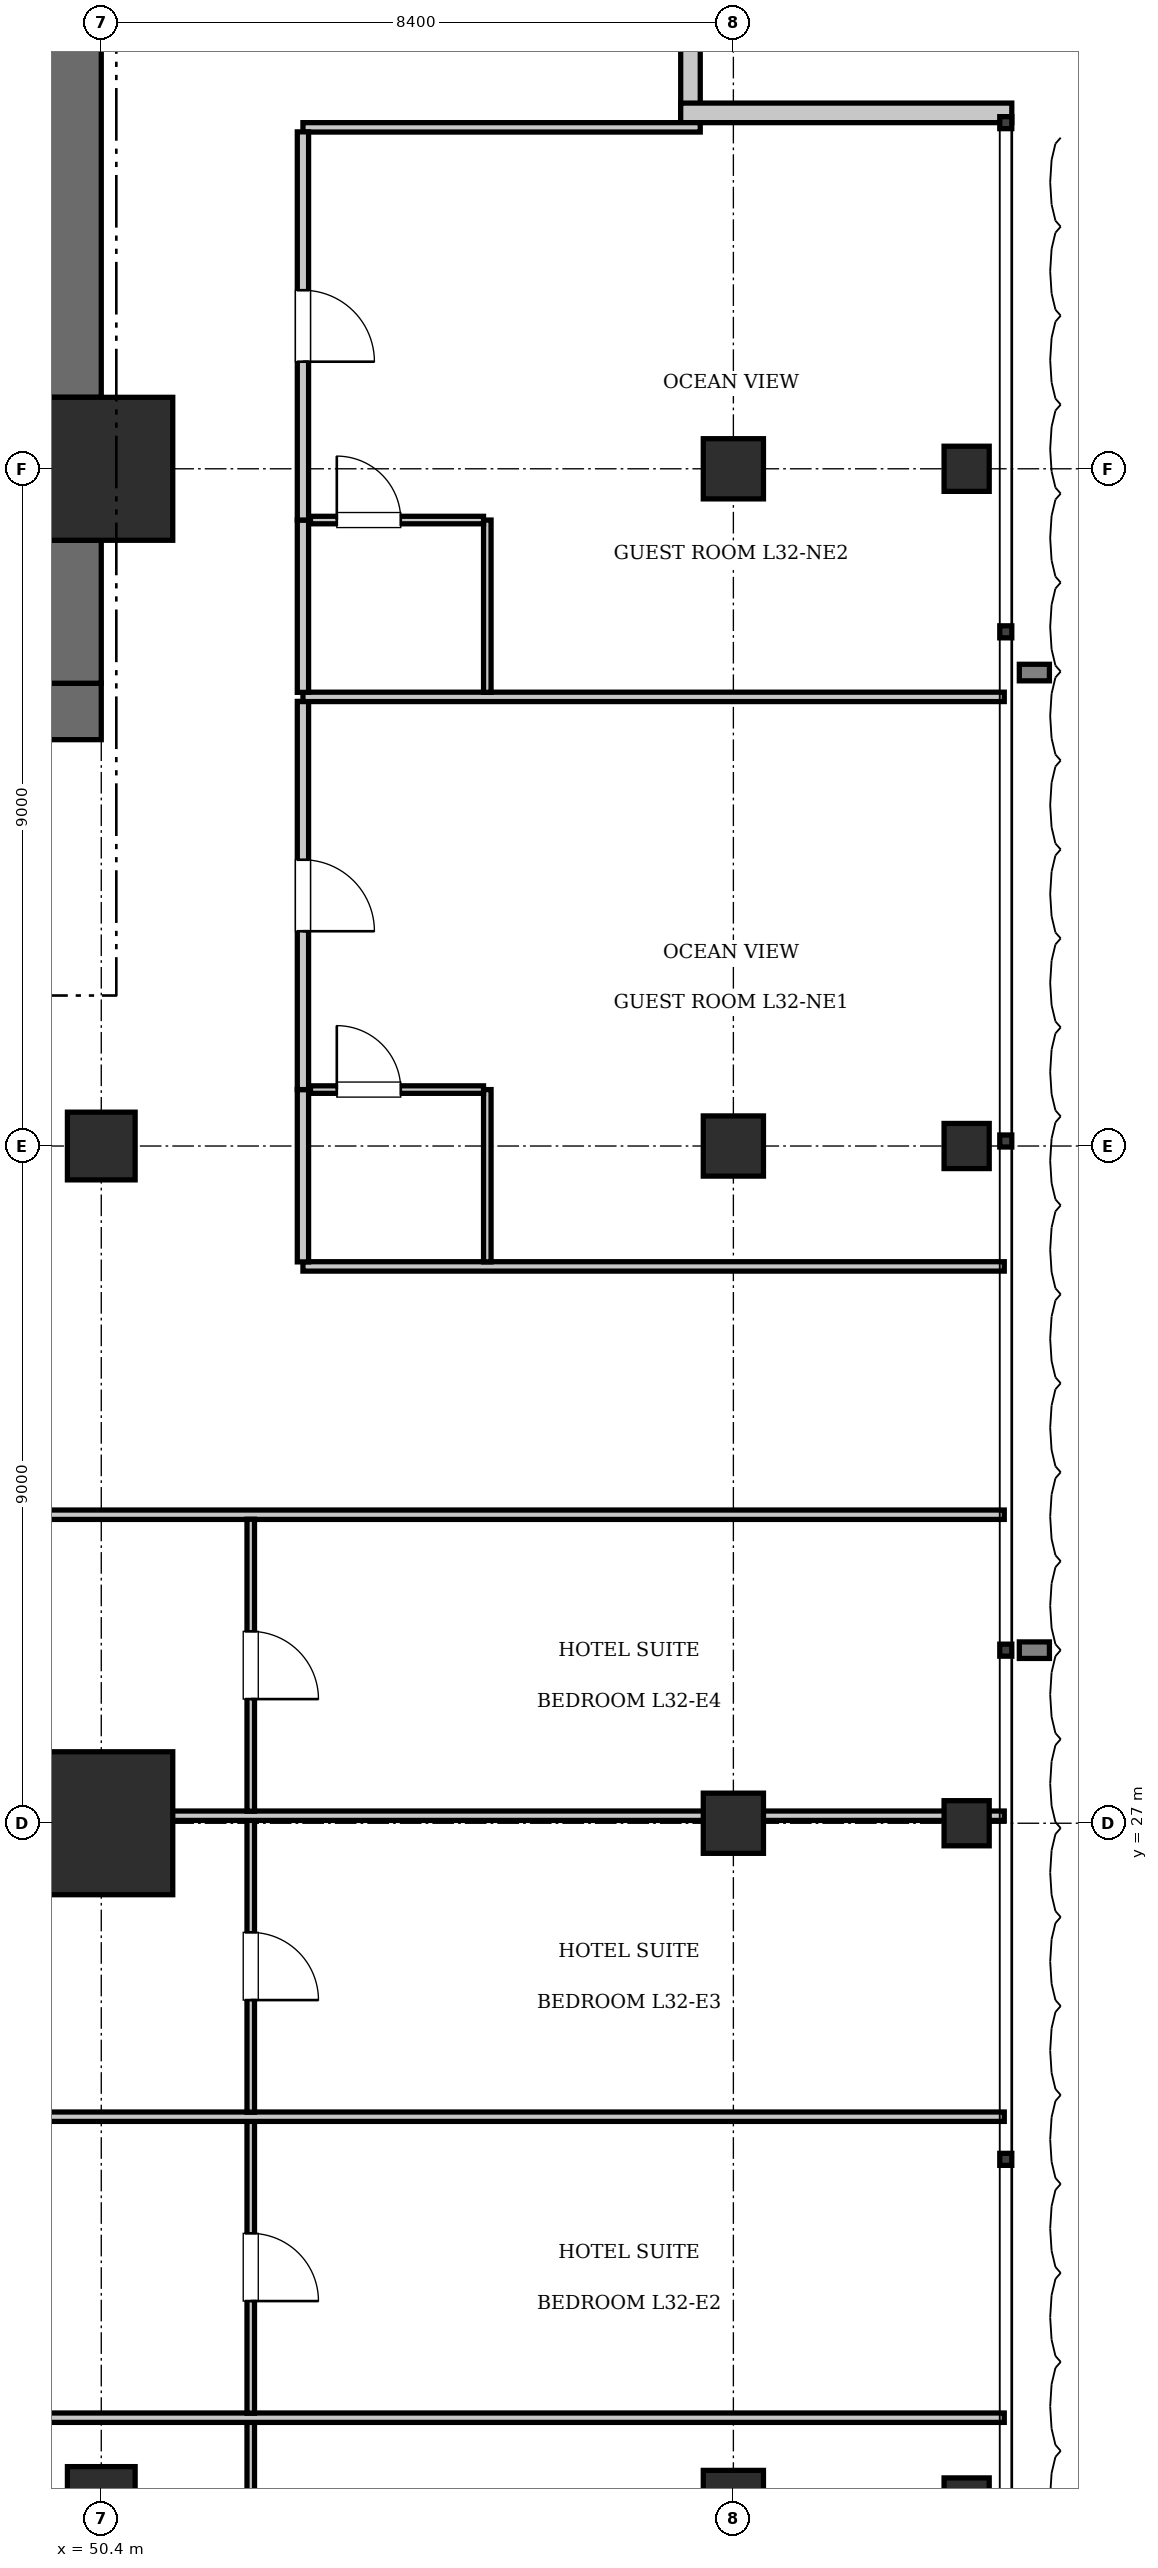
"""IFC4 building model, lengths in metres.
Left out: names, types, materials, properties, quantities, classifications, styles, units other than length and angle.
Written with IfcOpenShell. Run it as: python <this file> out.ifc"""

import sys

from ifc_helpers import new_model, si_unit, direction, frame, frame_2d, origin, origin_2d, place, context, subcontext, project, spatial, rectangle, i_section, extrude, element, fill, save


model = new_model("IFC4")
c1 = context("Model", 3, precision=1e-05, world=origin(), true_north=direction((0.0, 1.0)))
c2 = subcontext(c1, "Body", "Model", "MODEL_VIEW")
j1 = project(units=[si_unit("LENGTHUNIT", "METRE"), si_unit("PLANEANGLEUNIT", "RADIAN")], contexts=[c1])
p1 = place(None, origin())
s1 = spatial("IfcSite", under=j1, at=p1, CompositionType="ELEMENT")
p2 = place(p1, origin())
s2 = spatial("IfcBuilding", under=s1, at=p2, CompositionType="ELEMENT")
p3 = place(p2, frame((0.0, 0.0, 135.1)))
s3 = spatial("IfcBuildingStorey", under=s2, at=p3, CompositionType="ELEMENT", Elevation=135.1)
for number, where, z_axis, x_axis in (
    (1, (50.4, 27.0, 0.0), (0.0, 0.0, 1.0), (1.0, 0.0, 0.0)),
    (2, (50.4, 45.0, 0.0), (0.0, 0.0, 1.0), (1.0, 0.0, 0.0)),
):
    element("IfcColumn", number, at=place(p3, frame(where, z_axis=z_axis, x_axis=x_axis)), inside=s3, PredefinedType="COLUMN", context=c2, shape_type="SweptSolid", body=[
        extrude(rectangle(XDim=1.9, YDim=1.9, at=origin_2d()), origin(), (0.0, 0.0, 1.0), 3.85),
    ])
p4 = place(p3, frame((43.6, 41.775, 0.0), z_axis=(0.0, 0.0, 1.0), x_axis=(1.0, 0.0, 0.0)))
e3 = element("IfcWall", 3, at=p4, inside=s3, PredefinedType="SHEAR", context=c2, shape_type="SweptSolid", body=[
    extrude(rectangle(XDim=6.8, YDim=0.75, at=frame_2d((3.4, 0.0))), origin(), (0.0, 0.0, 1.0), 3.85),
])
p5 = place(p4, frame((3.9, 0.0, 0.0)))
e4 = element("IfcOpeningElement", 4, at=p5, cuts=e3, PredefinedType="OPENING", context=c2, shape_type="SweptSolid", body=[
    extrude(rectangle(XDim=1.15, YDim=2.15, at=frame_2d((0.575, 1.075))), frame((0.0, 0.385, 0.0), z_axis=(0.0, -1.0, 0.0), x_axis=(1.0, 0.0, 0.0)), (0.0, 0.0, 1.0), 0.77),
])
p6 = place(p4, frame((0.55, 0.0, 0.0)))
e5 = element("IfcOpeningElement", 5, at=p6, cuts=e3, PredefinedType="OPENING", context=c2, shape_type="SweptSolid", body=[
    extrude(rectangle(XDim=1.1, YDim=2.2, at=frame_2d((0.55, 1.1))), frame((0.0, 0.385, 0.0), z_axis=(0.0, -1.0, 0.0), x_axis=(1.0, 0.0, 0.0)), (0.0, 0.0, 1.0), 0.77),
])
p7 = place(p3, frame((50.025, 42.15, 0.0), z_axis=(0.0, 0.0, 1.0), x_axis=(0.0, 1.0, 0.0)))
e6 = element("IfcWall", 6, at=p7, inside=s3, PredefinedType="SHEAR", context=c2, shape_type="SweptSolid", body=[
    extrude(rectangle(XDim=1.9, YDim=0.75, at=frame_2d((0.95, 0.0))), origin(), (0.0, 0.0, 1.0), 3.85),
])
p8 = place(p3, frame((50.025, 45.95, 0.0), z_axis=(0.0, 0.0, 1.0), x_axis=(0.0, 1.0, 0.0)))
e7 = element("IfcWall", 7, at=p8, inside=s3, PredefinedType="SHEAR", context=c2, shape_type="SweptSolid", body=[
    extrude(rectangle(XDim=7.3, YDim=0.75, at=frame_2d((3.65, 0.0))), origin(), (0.0, 0.0, 1.0), 3.85),
])
for number, where, z_axis, x_axis in (
    (8, (50.4, 36.0, 0.0), (0.0, 0.0, 1.0), (1.0, 0.0, 0.0)),
    (9, (50.4, 18.0, 0.0), (0.0, 0.0, 1.0), (1.0, 0.0, 0.0)),
):
    element("IfcColumn", number, at=place(p3, frame(where, z_axis=z_axis, x_axis=x_axis)), inside=s3, PredefinedType="COLUMN", context=c2, shape_type="SweptSolid", body=[
        extrude(rectangle(XDim=0.9, YDim=0.9, at=origin_2d()), origin(), (0.0, 0.0, 1.0), 3.85),
    ])
for number, where, z_axis, x_axis in (
    (10, (58.8, 18.0, 0.0), (0.0, 0.0, 1.0), (1.0, 0.0, 0.0)),
    (11, (58.8, 27.0, 0.0), (0.0, 0.0, 1.0), (1.0, 0.0, 0.0)),
    (12, (58.8, 36.0, 0.0), (0.0, 0.0, 1.0), (1.0, 0.0, 0.0)),
    (13, (58.8, 45.0, 0.0), (0.0, 0.0, 1.0), (1.0, 0.0, 0.0)),
):
    element("IfcColumn", number, at=place(p3, frame(where, z_axis=z_axis, x_axis=x_axis)), inside=s3, PredefinedType="COLUMN", context=c2, shape_type="SweptSolid", body=[
        extrude(rectangle(XDim=0.8, YDim=0.8, at=origin_2d()), origin(), (0.0, 0.0, 1.0), 3.85),
    ])
for number, where, z_axis, x_axis in (
    (14, (61.9, 18.0, 0.0), (0.0, 0.0, 1.0), (1.0, 0.0, 0.0)),
    (15, (61.9, 27.0, 0.0), (0.0, 0.0, 1.0), (1.0, 0.0, 0.0)),
    (16, (61.9, 36.0, 0.0), (0.0, 0.0, 1.0), (1.0, 0.0, 0.0)),
    (17, (61.9, 45.0, 0.0), (0.0, 0.0, 1.0), (1.0, 0.0, 0.0)),
):
    element("IfcColumn", number, at=place(p3, frame(where, z_axis=z_axis, x_axis=x_axis)), inside=s3, PredefinedType="COLUMN", context=c2, shape_type="SweptSolid", body=[
        extrude(i_section(OverallWidth=0.6, OverallDepth=0.6, WebThickness=0.025, FlangeThickness=0.038, at=origin_2d()), origin(), (0.0, 0.0, 1.0), 3.85),
    ])
for number, where, z_axis, x_axis in (
    (18, (58.23, 54.0, 0.0), (0.0, 0.0, 1.0), (0.0, -1.0, 0.0)),
    (19, (58.1, 49.73, 0.0), (0.0, 0.0, 1.0), (1.0, 0.0, 0.0)),
):
    element("IfcWall", number, at=place(p3, frame(where, z_axis=z_axis, x_axis=x_axis)), inside=s3, PredefinedType="SOLIDWALL", context=c2, shape_type="SweptSolid", body=[
        extrude(rectangle(XDim=4.4, YDim=0.26, at=frame_2d((2.2, 0.0))), origin(), (0.0, 0.0, 1.0), 3.61),
    ])
p9 = place(p3, frame((38.98, 31.1, 0.0), z_axis=(0.0, 0.0, 1.0), x_axis=(1.0, 0.0, 0.0)))
e20 = element("IfcWall", 20, at=p9, inside=s3, PredefinedType="PARTITIONING", context=c2, shape_type="SweptSolid", body=[
    extrude(rectangle(XDim=23.42, YDim=0.125, at=frame_2d((11.71, 0.0))), origin(), (0.0, 0.0, 1.0), 3.61),
])
p10 = place(p3, frame((52.386, 15.16, 0.0), z_axis=(0.0, 0.0, 1.0), x_axis=(0.0, 1.0, 0.0)))
e21 = element("IfcWall", 21, at=p10, inside=s3, PredefinedType="PARTITIONING", context=c2, shape_type="SweptSolid", body=[
    extrude(rectangle(XDim=3.88, YDim=0.1, at=frame_2d((1.94, 0.0))), origin(), (0.0, 0.0, 1.0), 3.61),
])
p11 = place(p10, frame((1.49, 0.0, 0.0)))
e22 = element("IfcOpeningElement", 22, at=p11, cuts=e21, PredefinedType="OPENING", context=c2, shape_type="SweptSolid", body=[
    extrude(rectangle(XDim=0.9, YDim=2.1, at=frame_2d((0.45, 1.05))), frame((0.0, 0.06, 0.0), z_axis=(0.0, -1.0, 0.0), x_axis=(1.0, 0.0, 0.0)), (0.0, 0.0, 1.0), 0.12),
])
p12 = place(p3, frame((38.98, 19.1, 0.0), z_axis=(0.0, 0.0, 1.0), x_axis=(1.0, 0.0, 0.0)))
e23 = element("IfcWall", 23, at=p12, inside=s3, PredefinedType="PARTITIONING", context=c2, shape_type="SweptSolid", body=[
    extrude(rectangle(XDim=23.42, YDim=0.125, at=frame_2d((11.71, 0.0))), origin(), (0.0, 0.0, 1.0), 3.61),
])
p13 = place(p3, frame((52.386, 19.16, 0.0), z_axis=(0.0, 0.0, 1.0), x_axis=(0.0, 1.0, 0.0)))
e24 = element("IfcWall", 24, at=p13, inside=s3, PredefinedType="PARTITIONING", context=c2, shape_type="SweptSolid", body=[
    extrude(rectangle(XDim=3.88, YDim=0.1, at=frame_2d((1.94, 0.0))), origin(), (0.0, 0.0, 1.0), 3.61),
])
p14 = place(p13, frame((1.49, 0.0, 0.0)))
e25 = element("IfcOpeningElement", 25, at=p14, cuts=e24, PredefinedType="OPENING", context=c2, shape_type="SweptSolid", body=[
    extrude(rectangle(XDim=0.9, YDim=2.1, at=frame_2d((0.45, 1.05))), frame((0.0, 0.06, 0.0), z_axis=(0.0, -1.0, 0.0), x_axis=(1.0, 0.0, 0.0)), (0.0, 0.0, 1.0), 0.12),
])
p15 = place(p3, frame((38.98, 23.1, 0.0), z_axis=(0.0, 0.0, 1.0), x_axis=(1.0, 0.0, 0.0)))
e26 = element("IfcWall", 26, at=p15, inside=s3, PredefinedType="PARTITIONING", context=c2, shape_type="SweptSolid", body=[
    extrude(rectangle(XDim=23.42, YDim=0.125, at=frame_2d((11.71, 0.0))), origin(), (0.0, 0.0, 1.0), 3.61),
])
p16 = place(p3, frame((52.386, 23.16, 0.0), z_axis=(0.0, 0.0, 1.0), x_axis=(0.0, 1.0, 0.0)))
e27 = element("IfcWall", 27, at=p16, inside=s3, PredefinedType="PARTITIONING", context=c2, shape_type="SweptSolid", body=[
    extrude(rectangle(XDim=3.88, YDim=0.1, at=frame_2d((1.94, 0.0))), origin(), (0.0, 0.0, 1.0), 3.61),
])
p17 = place(p16, frame((1.49, 0.0, 0.0)))
e28 = element("IfcOpeningElement", 28, at=p17, cuts=e27, PredefinedType="OPENING", context=c2, shape_type="SweptSolid", body=[
    extrude(rectangle(XDim=0.9, YDim=2.1, at=frame_2d((0.45, 1.05))), frame((0.0, 0.06, 0.0), z_axis=(0.0, -1.0, 0.0), x_axis=(1.0, 0.0, 0.0)), (0.0, 0.0, 1.0), 0.12),
])
p18 = place(p3, frame((38.98, 27.1, 0.0), z_axis=(0.0, 0.0, 1.0), x_axis=(1.0, 0.0, 0.0)))
e29 = element("IfcWall", 29, at=p18, inside=s3, PredefinedType="PARTITIONING", context=c2, shape_type="SweptSolid", body=[
    extrude(rectangle(XDim=23.42, YDim=0.125, at=frame_2d((11.71, 0.0))), origin(), (0.0, 0.0, 1.0), 2.41),
])
p19 = place(p3, frame((52.386, 27.16, 0.0), z_axis=(0.0, 0.0, 1.0), x_axis=(0.0, 1.0, 0.0)))
e30 = element("IfcWall", 30, at=p19, inside=s3, PredefinedType="PARTITIONING", context=c2, shape_type="SweptSolid", body=[
    extrude(rectangle(XDim=3.88, YDim=0.1, at=frame_2d((1.94, 0.0))), origin(), (0.0, 0.0, 1.0), 3.61),
])
p20 = place(p19, frame((1.49, 0.0, 0.0)))
e31 = element("IfcOpeningElement", 31, at=p20, cuts=e30, PredefinedType="OPENING", context=c2, shape_type="SweptSolid", body=[
    extrude(rectangle(XDim=0.9, YDim=2.1, at=frame_2d((0.45, 1.05))), frame((0.0, 0.06, 0.0), z_axis=(0.0, -1.0, 0.0), x_axis=(1.0, 0.0, 0.0)), (0.0, 0.0, 1.0), 0.12),
])
p21 = place(p3, frame((53.08, 34.4, 0.0), z_axis=(0.0, 0.0, 1.0), x_axis=(1.0, 0.0, 0.0)))
e32 = element("IfcWall", 32, at=p21, inside=s3, PredefinedType="PARTITIONING", context=c2, shape_type="SweptSolid", body=[
    extrude(rectangle(XDim=9.32, YDim=0.125, at=frame_2d((4.66, 0.0))), origin(), (0.0, 0.0, 1.0), 3.61),
])
p22 = place(p3, frame((53.08, 49.538, 0.0), z_axis=(0.0, 0.0, 1.0), x_axis=(1.0, 0.0, 0.0)))
e33 = element("IfcWall", 33, at=p22, inside=s3, PredefinedType="PARTITIONING", context=c2, shape_type="SweptSolid", body=[
    extrude(rectangle(XDim=5.28, YDim=0.125, at=frame_2d((2.64, 0.0))), origin(), (0.0, 0.0, 1.0), 3.61),
])
p23 = place(p3, frame((53.08, 34.46, 0.0), z_axis=(0.0, 0.0, 1.0), x_axis=(0.0, 1.0, 0.0)))
e34 = element("IfcWall", 34, at=p23, inside=s3, PredefinedType="PARTITIONING", context=c2, shape_type="SweptSolid", body=[
    extrude(rectangle(XDim=2.29, YDim=0.15, at=frame_2d((1.145, 0.0))), origin(), (0.0, 0.0, 1.0), 3.61),
])
p24 = place(p3, frame((53.08, 36.75, 0.0), z_axis=(0.0, 0.0, 1.0), x_axis=(0.0, 1.0, 0.0)))
e35 = element("IfcWall", 35, at=p24, inside=s3, PredefinedType="PARTITIONING", context=c2, shape_type="SweptSolid", body=[
    extrude(rectangle(XDim=5.159, YDim=0.15, at=frame_2d((2.579, 0.0))), origin(), (0.0, 0.0, 1.0), 3.61),
])
p25 = place(p24, frame((2.104, 0.0, 0.0)))
e36 = element("IfcOpeningElement", 36, at=p25, cuts=e35, PredefinedType="OPENING", context=c2, shape_type="SweptSolid", body=[
    extrude(rectangle(XDim=0.95, YDim=2.15, at=frame_2d((0.475, 1.075))), frame((0.0, 0.085, 0.0), z_axis=(0.0, -1.0, 0.0), x_axis=(1.0, 0.0, 0.0)), (0.0, 0.0, 1.0), 0.17),
])
p26 = place(p3, frame((55.53, 34.46, 0.0), z_axis=(0.0, 0.0, 1.0), x_axis=(0.0, 1.0, 0.0)))
e37 = element("IfcWall", 37, at=p26, inside=s3, PredefinedType="PARTITIONING", context=c2, shape_type="SweptSolid", body=[
    extrude(rectangle(XDim=2.29, YDim=0.1, at=frame_2d((1.145, 0.0))), origin(), (0.0, 0.0, 1.0), 3.61),
])
p27 = place(p3, frame((53.18, 36.75, 0.0), z_axis=(0.0, 0.0, 1.0), x_axis=(1.0, 0.0, 0.0)))
e38 = element("IfcWall", 38, at=p27, inside=s3, PredefinedType="PARTITIONING", context=c2, shape_type="SweptSolid", body=[
    extrude(rectangle(XDim=2.3, YDim=0.1, at=frame_2d((1.15, 0.0))), origin(), (0.0, 0.0, 1.0), 3.61),
])
p28 = place(p27, frame((0.35, 0.0, 0.0)))
e39 = element("IfcOpeningElement", 39, at=p28, cuts=e38, PredefinedType="OPENING", context=c2, shape_type="SweptSolid", body=[
    extrude(rectangle(XDim=0.85, YDim=2.1, at=frame_2d((0.425, 1.05))), frame((0.0, 0.06, 0.0), z_axis=(0.0, -1.0, 0.0), x_axis=(1.0, 0.0, 0.0)), (0.0, 0.0, 1.0), 0.12),
])
p29 = place(p3, frame((53.08, 41.969, 0.0), z_axis=(0.0, 0.0, 1.0), x_axis=(1.0, 0.0, 0.0)))
e40 = element("IfcWall", 40, at=p29, inside=s3, PredefinedType="PARTITIONING", context=c2, shape_type="SweptSolid", body=[
    extrude(rectangle(XDim=9.32, YDim=0.125, at=frame_2d((4.66, 0.0))), origin(), (0.0, 0.0, 1.0), 3.61),
])
p30 = place(p3, frame((53.08, 42.029, 0.0), z_axis=(0.0, 0.0, 1.0), x_axis=(0.0, 1.0, 0.0)))
e41 = element("IfcWall", 41, at=p30, inside=s3, PredefinedType="PARTITIONING", context=c2, shape_type="SweptSolid", body=[
    extrude(rectangle(XDim=2.29, YDim=0.15, at=frame_2d((1.145, 0.0))), origin(), (0.0, 0.0, 1.0), 3.61),
])
p31 = place(p3, frame((53.08, 44.319, 0.0), z_axis=(0.0, 0.0, 1.0), x_axis=(0.0, 1.0, 0.0)))
e42 = element("IfcWall", 42, at=p31, inside=s3, PredefinedType="PARTITIONING", context=c2, shape_type="SweptSolid", body=[
    extrude(rectangle(XDim=5.159, YDim=0.15, at=frame_2d((2.579, 0.0))), origin(), (0.0, 0.0, 1.0), 3.61),
])
p32 = place(p31, frame((2.104, 0.0, 0.0)))
e43 = element("IfcOpeningElement", 43, at=p32, cuts=e42, PredefinedType="OPENING", context=c2, shape_type="SweptSolid", body=[
    extrude(rectangle(XDim=0.95, YDim=2.15, at=frame_2d((0.475, 1.075))), frame((0.0, 0.085, 0.0), z_axis=(0.0, -1.0, 0.0), x_axis=(1.0, 0.0, 0.0)), (0.0, 0.0, 1.0), 0.17),
])
p33 = place(p3, frame((55.53, 42.029, 0.0), z_axis=(0.0, 0.0, 1.0), x_axis=(0.0, 1.0, 0.0)))
e44 = element("IfcWall", 44, at=p33, inside=s3, PredefinedType="PARTITIONING", context=c2, shape_type="SweptSolid", body=[
    extrude(rectangle(XDim=2.29, YDim=0.1, at=frame_2d((1.145, 0.0))), origin(), (0.0, 0.0, 1.0), 3.61),
])
p34 = place(p3, frame((53.18, 44.319, 0.0), z_axis=(0.0, 0.0, 1.0), x_axis=(1.0, 0.0, 0.0)))
e45 = element("IfcWall", 45, at=p34, inside=s3, PredefinedType="PARTITIONING", context=c2, shape_type="SweptSolid", body=[
    extrude(rectangle(XDim=2.3, YDim=0.1, at=frame_2d((1.15, 0.0))), origin(), (0.0, 0.0, 1.0), 3.61),
])
p35 = place(p34, frame((0.35, 0.0, 0.0)))
e46 = element("IfcOpeningElement", 46, at=p35, cuts=e45, PredefinedType="OPENING", context=c2, shape_type="SweptSolid", body=[
    extrude(rectangle(XDim=0.85, YDim=2.1, at=frame_2d((0.425, 1.05))), frame((0.0, 0.06, 0.0), z_axis=(0.0, -1.0, 0.0), x_axis=(1.0, 0.0, 0.0)), (0.0, 0.0, 1.0), 0.12),
])
p36 = place(p14, frame((0.9, 0.0, 0.0), z_axis=(0.0, 0.0, 1.0), x_axis=(-1.0, 0.0, 0.0)))
e47 = element("IfcDoor", 47, at=p36, inside=s3, OperationType="SINGLE_SWING_RIGHT", PredefinedType="DOOR", context=c2, shape_type="SweptSolid", body=[
    extrude(rectangle(XDim=0.9, YDim=2.1, at=frame_2d((0.45, 1.05))), frame((0.0, 0.025, 0.0), z_axis=(0.0, -1.0, 0.0), x_axis=(1.0, 0.0, 0.0)), (0.0, 0.0, 1.0), 0.05),
])
fill(e25, e47)
p37 = place(p17, frame((0.9, 0.0, 0.0), z_axis=(0.0, 0.0, 1.0), x_axis=(-1.0, 0.0, 0.0)))
e48 = element("IfcDoor", 48, at=p37, inside=s3, OperationType="SINGLE_SWING_RIGHT", PredefinedType="DOOR", context=c2, shape_type="SweptSolid", body=[
    extrude(rectangle(XDim=0.9, YDim=2.1, at=frame_2d((0.45, 1.05))), frame((0.0, 0.025, 0.0), z_axis=(0.0, -1.0, 0.0), x_axis=(1.0, 0.0, 0.0)), (0.0, 0.0, 1.0), 0.05),
])
fill(e28, e48)
p38 = place(p20, frame((0.9, 0.0, 0.0), z_axis=(0.0, 0.0, 1.0), x_axis=(-1.0, 0.0, 0.0)))
e49 = element("IfcDoor", 49, at=p38, inside=s3, OperationType="SINGLE_SWING_RIGHT", PredefinedType="DOOR", context=c2, shape_type="SweptSolid", body=[
    extrude(rectangle(XDim=0.9, YDim=2.1, at=frame_2d((0.45, 1.05))), frame((0.0, 0.025, 0.0), z_axis=(0.0, -1.0, 0.0), x_axis=(1.0, 0.0, 0.0)), (0.0, 0.0, 1.0), 0.05),
])
fill(e31, e49)
p39 = place(p28, origin())
e50 = element("IfcDoor", 50, at=p39, inside=s3, OperationType="SINGLE_SWING_LEFT", PredefinedType="DOOR", context=c2, shape_type="SweptSolid", body=[
    extrude(rectangle(XDim=0.85, YDim=2.1, at=frame_2d((0.425, 1.05))), frame((0.0, 0.025, 0.0), z_axis=(0.0, -1.0, 0.0), x_axis=(1.0, 0.0, 0.0)), (0.0, 0.0, 1.0), 0.05),
])
fill(e39, e50)
p40 = place(p25, frame((0.95, 0.0, 0.0), z_axis=(0.0, 0.0, 1.0), x_axis=(-1.0, 0.0, 0.0)))
e51 = element("IfcDoor", 51, at=p40, inside=s3, OperationType="SINGLE_SWING_RIGHT", PredefinedType="DOOR", context=c2, shape_type="SweptSolid", body=[
    extrude(rectangle(XDim=0.95, YDim=2.15, at=frame_2d((0.475, 1.075))), frame((0.0, 0.025, 0.0), z_axis=(0.0, -1.0, 0.0), x_axis=(1.0, 0.0, 0.0)), (0.0, 0.0, 1.0), 0.05),
])
fill(e36, e51)
p41 = place(p35, origin())
e52 = element("IfcDoor", 52, at=p41, inside=s3, OperationType="SINGLE_SWING_LEFT", PredefinedType="DOOR", context=c2, shape_type="SweptSolid", body=[
    extrude(rectangle(XDim=0.85, YDim=2.1, at=frame_2d((0.425, 1.05))), frame((0.0, 0.025, 0.0), z_axis=(0.0, -1.0, 0.0), x_axis=(1.0, 0.0, 0.0)), (0.0, 0.0, 1.0), 0.05),
])
fill(e46, e52)
p42 = place(p32, frame((0.95, 0.0, 0.0), z_axis=(0.0, 0.0, 1.0), x_axis=(-1.0, 0.0, 0.0)))
e53 = element("IfcDoor", 53, at=p42, inside=s3, OperationType="SINGLE_SWING_RIGHT", PredefinedType="DOOR", context=c2, shape_type="SweptSolid", body=[
    extrude(rectangle(XDim=0.95, YDim=2.15, at=frame_2d((0.475, 1.075))), frame((0.0, 0.025, 0.0), z_axis=(0.0, -1.0, 0.0), x_axis=(1.0, 0.0, 0.0)), (0.0, 0.0, 1.0), 0.05),
])
fill(e43, e53)
save(model, sys.argv[1])
